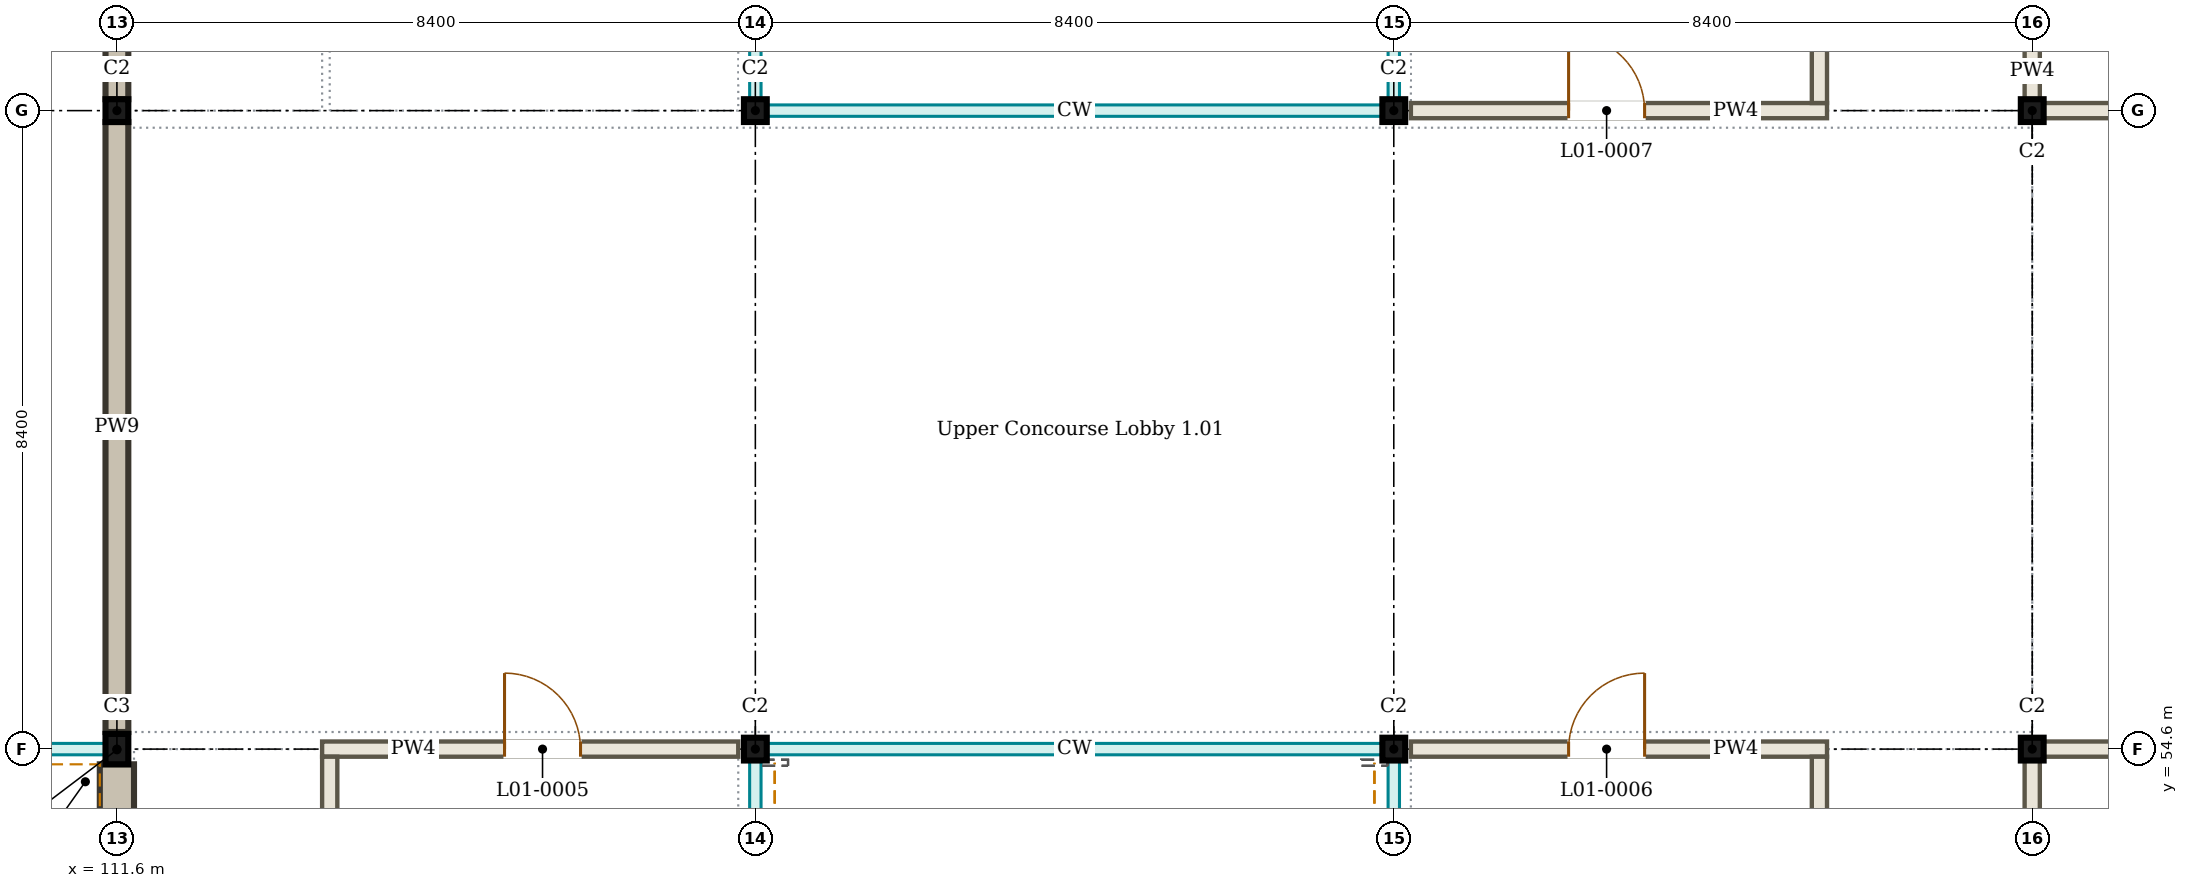
"""IFC4 building model, lengths in metres.
Left out: names, types, materials, properties, quantities, classifications, styles, units other than length and angle.
Written with IfcOpenShell. Run it as: python <this file> out.ifc"""

import sys

from ifc_helpers import new_model, si_unit, direction, frame, frame_2d, origin, origin_2d, place, context, subcontext, project, spatial, rectangle, i_section, extrude, element, fill, save


model = new_model("IFC4")
c1 = context("Model", 3, precision=1e-05, world=origin(), true_north=direction((0.0, 1.0)))
c2 = subcontext(c1, "Body", "Model", "MODEL_VIEW")
j1 = project(units=[si_unit("LENGTHUNIT", "METRE"), si_unit("PLANEANGLEUNIT", "RADIAN")], contexts=[c1])
p1 = place(None, origin())
s1 = spatial("IfcSite", under=j1, at=p1, CompositionType="ELEMENT")
p2 = place(p1, origin())
s2 = spatial("IfcBuilding", under=s1, at=p2, CompositionType="ELEMENT")
p3 = place(p2, frame((0.0, 0.0, 4.5)))
s3 = spatial("IfcBuildingStorey", under=s2, at=p3, CompositionType="ELEMENT", Elevation=4.5)
p4 = place(p3, frame((111.6, 54.6, 0.0), z_axis=(0.0, 0.0, 1.0), x_axis=(1.0, 0.0, 0.0)))
e1 = element("IfcColumn", 1, at=p4, inside=s3, PredefinedType="COLUMN", context=c2, shape_type="SweptSolid", body=[
    extrude(i_section(OverallWidth=0.3, OverallDepth=0.4, WebThickness=0.013, FlangeThickness=0.024, FilletRadius=0.027, at=origin_2d()), origin(), (0.0, 0.0, 1.0), 4.5),
])
for number, where, z_axis, x_axis in (
    (2, (120.0, 54.6, 0.0), (0.0, 0.0, 1.0), (1.0, 0.0, 0.0)),
    (3, (128.4, 54.6, 0.0), (0.0, 0.0, 1.0), (1.0, 0.0, 0.0)),
    (4, (136.8, 54.6, 0.0), (0.0, 0.0, 1.0), (1.0, 0.0, 0.0)),
    (5, (111.6, 63.0, 0.0), (0.0, 0.0, 1.0), (1.0, 0.0, 0.0)),
    (6, (120.0, 63.0, 0.0), (0.0, 0.0, 1.0), (1.0, 0.0, 0.0)),
    (7, (128.4, 63.0, 0.0), (0.0, 0.0, 1.0), (1.0, 0.0, 0.0)),
    (8, (136.8, 63.0, 0.0), (0.0, 0.0, 1.0), (1.0, 0.0, 0.0)),
):
    element("IfcColumn", number, at=place(p3, frame(where, z_axis=z_axis, x_axis=x_axis)), inside=s3, PredefinedType="COLUMN", context=c2, shape_type="SweptSolid", body=[
        extrude(i_section(OverallWidth=0.3, OverallDepth=0.3, WebThickness=0.011, FlangeThickness=0.019, FilletRadius=0.027, at=origin_2d()), origin(), (0.0, 0.0, 1.0), 4.5),
    ])
p5 = place(p3, frame((111.6, 46.345, 0.0), z_axis=(0.0, 0.0, 1.0), x_axis=(0.0, 1.0, 0.0)))
e9 = element("IfcWall", 9, at=p5, inside=s3, PredefinedType="SOLIDWALL", context=c2, shape_type="SweptSolid", body=[
    extrude(rectangle(XDim=8.055, YDim=0.45, at=frame_2d((4.027, 0.0))), origin(), (0.0, 0.0, 1.0), 3.886),
])
p6 = place(p3, frame((114.3, 54.6, 0.0), z_axis=(0.0, 0.0, 1.0), x_axis=(1.0, 0.0, 0.0)))
e10 = element("IfcWall", 10, at=p6, inside=s3, PredefinedType="PARTITIONING", context=c2, shape_type="SweptSolid", body=[
    extrude(rectangle(XDim=5.475, YDim=0.2, at=frame_2d((2.737, 0.0))), origin(), (0.0, 0.0, 1.0), 3.9),
])
p7 = place(p6, frame((2.4, 0.0, 0.0)))
e11 = element("IfcOpeningElement", 11, at=p7, cuts=e10, PredefinedType="OPENING", context=c2, shape_type="SweptSolid", body=[
    extrude(rectangle(XDim=1.0, YDim=2.1, at=frame_2d((0.5, 1.05))), frame((0.0, 0.11, 0.0), z_axis=(0.0, -1.0, 0.0), x_axis=(1.0, 0.0, 0.0)), (0.0, 0.0, 1.0), 0.22),
])
p8 = place(p3, frame((128.625, 54.6, 0.0), z_axis=(0.0, 0.0, 1.0), x_axis=(1.0, 0.0, 0.0)))
e12 = element("IfcWall", 12, at=p8, inside=s3, PredefinedType="PARTITIONING", context=c2, shape_type="SweptSolid", body=[
    extrude(rectangle(XDim=5.475, YDim=0.2, at=frame_2d((2.738, 0.0))), origin(), (0.0, 0.0, 1.0), 3.9),
])
p9 = place(p8, frame((2.075, 0.0, 0.0)))
e13 = element("IfcOpeningElement", 13, at=p9, cuts=e12, PredefinedType="OPENING", context=c2, shape_type="SweptSolid", body=[
    extrude(rectangle(XDim=1.0, YDim=2.1, at=frame_2d((0.5, 1.05))), frame((0.0, 0.11, 0.0), z_axis=(0.0, -1.0, 0.0), x_axis=(1.0, 0.0, 0.0)), (0.0, 0.0, 1.0), 0.22),
])
p10 = place(p3, frame((136.95, 54.6, 0.0), z_axis=(0.0, 0.0, 1.0), x_axis=(1.0, 0.0, 0.0)))
e14 = element("IfcWall", 14, at=p10, inside=s3, PredefinedType="PARTITIONING", context=c2, shape_type="SweptSolid", body=[
    extrude(rectangle(XDim=8.025, YDim=0.2, at=frame_2d((4.013, 0.0))), origin(), (0.0, 0.0, 1.0), 3.9),
])
p11 = place(p3, frame((128.625, 63.0, 0.0), z_axis=(0.0, 0.0, 1.0), x_axis=(1.0, 0.0, 0.0)))
e15 = element("IfcWall", 15, at=p11, inside=s3, PredefinedType="PARTITIONING", context=c2, shape_type="SweptSolid", body=[
    extrude(rectangle(XDim=5.475, YDim=0.2, at=frame_2d((2.738, 0.0))), origin(), (0.0, 0.0, 1.0), 3.9),
])
p12 = place(p11, frame((2.075, 0.0, 0.0)))
e16 = element("IfcOpeningElement", 16, at=p12, cuts=e15, PredefinedType="OPENING", context=c2, shape_type="SweptSolid", body=[
    extrude(rectangle(XDim=1.0, YDim=2.1, at=frame_2d((0.5, 1.05))), frame((0.0, 0.11, 0.0), z_axis=(0.0, -1.0, 0.0), x_axis=(1.0, 0.0, 0.0)), (0.0, 0.0, 1.0), 0.22),
])
p13 = place(p3, frame((136.95, 63.0, 0.0), z_axis=(0.0, 0.0, 1.0), x_axis=(1.0, 0.0, 0.0)))
e17 = element("IfcWall", 17, at=p13, inside=s3, PredefinedType="PARTITIONING", context=c2, shape_type="SweptSolid", body=[
    extrude(rectangle(XDim=8.025, YDim=0.2, at=frame_2d((4.013, 0.0))), origin(), (0.0, 0.0, 1.0), 3.9),
])
p14 = place(p3, frame((111.6, 54.825, 0.0), z_axis=(0.0, 0.0, 1.0), x_axis=(0.0, 1.0, 0.0)))
e18 = element("IfcWall", 18, at=p14, inside=s3, PredefinedType="SOLIDWALL", context=c2, shape_type="SweptSolid", body=[
    extrude(rectangle(XDim=8.025, YDim=0.3, at=frame_2d((4.013, 0.0))), origin(), (0.0, 0.0, 1.0), 3.936),
])
p15 = place(p3, frame((111.6, 63.15, 0.0), z_axis=(0.0, 0.0, 1.0), x_axis=(0.0, 1.0, 0.0)))
e19 = element("IfcWall", 19, at=p15, inside=s3, PredefinedType="SOLIDWALL", context=c2, shape_type="SweptSolid", body=[
    extrude(rectangle(XDim=8.1, YDim=0.3, at=frame_2d((4.05, 0.0))), origin(), (0.0, 0.0, 1.0), 3.936),
])
p16 = place(p3, frame((114.4, 51.875, 0.0), z_axis=(0.0, 0.0, 1.0), x_axis=(0.0, 1.0, 0.0)))
e20 = element("IfcWall", 20, at=p16, inside=s3, PredefinedType="PARTITIONING", context=c2, shape_type="SweptSolid", body=[
    extrude(rectangle(XDim=2.625, YDim=0.2, at=frame_2d((1.312, 0.0))), origin(), (0.0, 0.0, 1.0), 3.996),
])
p17 = place(p3, frame((134.0, 51.89, 0.0), z_axis=(0.0, 0.0, 1.0), x_axis=(0.0, 1.0, 0.0)))
e21 = element("IfcWall", 21, at=p17, inside=s3, PredefinedType="PARTITIONING", context=c2, shape_type="SweptSolid", body=[
    extrude(rectangle(XDim=2.61, YDim=0.2, at=frame_2d((1.305, 0.0))), origin(), (0.0, 0.0, 1.0), 3.996),
])
p18 = place(p3, frame((134.0, 63.1, 0.0), z_axis=(0.0, 0.0, 1.0), x_axis=(0.0, 1.0, 0.0)))
e22 = element("IfcWall", 22, at=p18, inside=s3, PredefinedType="PARTITIONING", context=c2, shape_type="SweptSolid", body=[
    extrude(rectangle(XDim=2.6, YDim=0.2, at=frame_2d((1.3, 0.0))), origin(), (0.0, 0.0, 1.0), 3.996),
])
p19 = place(p3, frame((136.8, 49.09, 0.0), z_axis=(0.0, 0.0, 1.0), x_axis=(0.0, 1.0, 0.0)))
e23 = element("IfcWall", 23, at=p19, inside=s3, PredefinedType="PARTITIONING", context=c2, shape_type="SweptSolid", body=[
    extrude(rectangle(XDim=5.36, YDim=0.2, at=frame_2d((2.68, 0.0))), origin(), (0.0, 0.0, 1.0), 3.9),
])
p20 = place(p19, frame((2.21, 0.0, 0.0)))
e24 = element("IfcOpeningElement", 24, at=p20, cuts=e23, PredefinedType="OPENING", context=c2, shape_type="SweptSolid", body=[
    extrude(rectangle(XDim=1.0, YDim=2.1, at=frame_2d((0.5, 1.05))), frame((0.0, 0.11, 0.0), z_axis=(0.0, -1.0, 0.0), x_axis=(1.0, 0.0, 0.0)), (0.0, 0.0, 1.0), 0.22),
])
p21 = place(p3, frame((136.8, 63.15, 0.0), z_axis=(0.0, 0.0, 1.0), x_axis=(0.0, 1.0, 0.0)))
e25 = element("IfcWall", 25, at=p21, inside=s3, PredefinedType="PARTITIONING", context=c2, shape_type="SweptSolid", body=[
    extrude(rectangle(XDim=2.56, YDim=0.2, at=frame_2d((1.28, 0.0))), origin(), (0.0, 0.0, 1.0), 3.9),
])
p22 = place(p21, frame((0.75, 0.0, 0.0)))
e26 = element("IfcOpeningElement", 26, at=p22, cuts=e25, PredefinedType="OPENING", context=c2, shape_type="SweptSolid", body=[
    extrude(rectangle(XDim=1.0, YDim=2.1, at=frame_2d((0.5, 1.05))), frame((0.0, 0.11, 0.0), z_axis=(0.0, -1.0, 0.0), x_axis=(1.0, 0.0, 0.0)), (0.0, 0.0, 1.0), 0.22),
])
p23 = place(p7, origin())
e27 = element("IfcDoor", 27, at=p23, inside=s3, OperationType="SINGLE_SWING_LEFT", PredefinedType="DOOR", context=c2, shape_type="SweptSolid", body=[
    extrude(rectangle(XDim=1.0, YDim=2.1, at=frame_2d((0.5, 1.05))), frame((0.0, 0.025, 0.0), z_axis=(0.0, -1.0, 0.0), x_axis=(1.0, 0.0, 0.0)), (0.0, 0.0, 1.0), 0.05),
])
fill(e11, e27)
p24 = place(p9, origin())
e28 = element("IfcDoor", 28, at=p24, inside=s3, OperationType="SINGLE_SWING_RIGHT", PredefinedType="DOOR", context=c2, shape_type="SweptSolid", body=[
    extrude(rectangle(XDim=1.0, YDim=2.1, at=frame_2d((0.5, 1.05))), frame((0.0, 0.025, 0.0), z_axis=(0.0, -1.0, 0.0), x_axis=(1.0, 0.0, 0.0)), (0.0, 0.0, 1.0), 0.05),
])
fill(e13, e28)
p25 = place(p12, origin())
e29 = element("IfcDoor", 29, at=p25, inside=s3, OperationType="SINGLE_SWING_LEFT", PredefinedType="DOOR", context=c2, shape_type="SweptSolid", body=[
    extrude(rectangle(XDim=1.0, YDim=2.1, at=frame_2d((0.5, 1.05))), frame((0.0, 0.025, 0.0), z_axis=(0.0, -1.0, 0.0), x_axis=(1.0, 0.0, 0.0)), (0.0, 0.0, 1.0), 0.05),
])
fill(e16, e29)
save(model, sys.argv[1])
